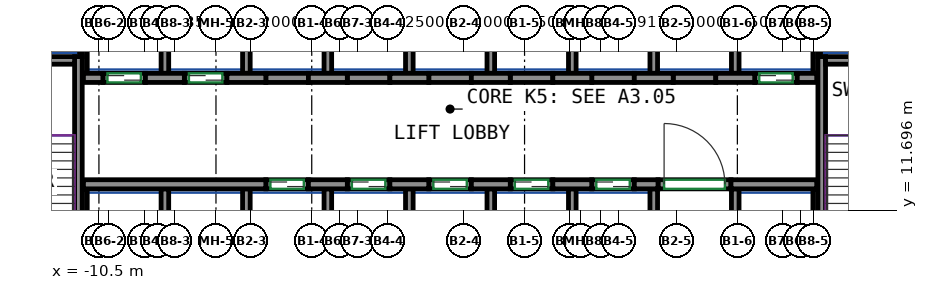
"""IFC4 building model, lengths in metres.
Left out: names, types, materials, properties, quantities, classifications, styles, units other than length and angle.
Written with IfcOpenShell. Run it as: python <this file> out.ifc"""

import sys

from ifc_helpers import new_model, si_unit, direction, frame, frame_2d, origin, place, context, subcontext, project, spatial, rectangle, extrude, source, transform, mapped, element, fill, save


model = new_model("IFC4")
c1 = context("Model", 3, precision=1e-05, world=origin(), true_north=direction((0.0, 1.0)))
c2 = subcontext(c1, "Body", "Model", "MODEL_VIEW")
j1 = project(units=[si_unit("LENGTHUNIT", "METRE"), si_unit("PLANEANGLEUNIT", "RADIAN")], contexts=[c1])
p1 = place(None, origin())
s1 = spatial("IfcSite", under=j1, at=p1, CompositionType="ELEMENT")
p2 = place(p1, origin())
s2 = spatial("IfcBuilding", under=s1, at=p2, CompositionType="ELEMENT")
p3 = place(p2, frame((0.0, 0.0, 22.5)))
s3 = spatial("IfcBuildingStorey", under=s2, at=p3, CompositionType="ELEMENT", Elevation=22.5)
m1 = source(origin(), c2, "Body", "SweptSolid", [
    extrude(rectangle(XDim=7.75, YDim=0.25, at=frame_2d((3.875, 0.0))), origin(), (0.0, 0.0, 1.0), 4.22),
])
p4 = place(p3, frame((-11.175, 9.0, 0.0), z_axis=(0.0, 0.0, 1.0), x_axis=(0.0, 1.0, 0.0)))
e1 = element("IfcWall", 1, at=p4, inside=s3, PredefinedType="SHEAR", context=c2, shape_type="MappedRepresentation", body=[
    mapped(m1, transform((0.0, 0.0, 0.0))),
])
m2 = source(origin(), c2, "Body", "SweptSolid", [
    extrude(rectangle(XDim=3.7, YDim=0.25, at=frame_2d((1.85, 0.0))), origin(), (0.0, 0.0, 1.0), 4.22),
])
p5 = place(p3, frame((-15.0, 16.625, 0.0), z_axis=(0.0, 0.0, 1.0), x_axis=(1.0, 0.0, 0.0)))
e2 = element("IfcWall", 2, at=p5, inside=s3, PredefinedType="SHEAR", context=c2, shape_type="MappedRepresentation", body=[
    mapped(m2, transform((0.0, 0.0, 0.0))),
])
p6 = place(p3, frame((13.275, 9.0, 0.0), z_axis=(0.0, 0.0, 1.0), x_axis=(0.0, 1.0, 0.0)))
e3 = element("IfcWall", 3, at=p6, inside=s3, PredefinedType="SHEAR", context=c2, shape_type="MappedRepresentation", body=[
    mapped(m1, transform((0.0, 0.0, 0.0))),
])
m3 = source(origin(), c2, "Body", "SweptSolid", [
    extrude(rectangle(XDim=3.7, YDim=0.25, at=frame_2d((1.85, 0.0))), origin(), (0.0, 0.0, 1.0), 4.22),
])
p7 = place(p3, frame((13.4, 16.625, 0.0), z_axis=(0.0, 0.0, 1.0), x_axis=(1.0, 0.0, 0.0)))
e4 = element("IfcWall", 4, at=p7, inside=s3, PredefinedType="SHEAR", context=c2, shape_type="MappedRepresentation", body=[
    mapped(m3, transform((0.0, 0.0, 0.0))),
])
m4 = source(origin(), c2, "Body", "SweptSolid", [
    extrude(rectangle(XDim=6.0, YDim=0.3, at=frame_2d((3.0, 0.0))), origin(), (0.0, 0.0, 1.0), 4.22),
])
p8 = place(p3, frame((-11.01, 12.55, 0.0), z_axis=(0.0, 0.0, 1.0), x_axis=(1.0, 0.0, 0.0)))
e5 = element("IfcWall", 5, at=p8, inside=s3, PredefinedType="SHEAR", context=c2, shape_type="MappedRepresentation", body=[
    mapped(m4, transform((0.0, 0.0, 0.0))),
])
m5 = source(origin(), c2, "Body", "SweptSolid", [
    extrude(rectangle(XDim=1.28, YDim=0.3, at=frame_2d((0.64, 0.0))), origin(), (0.0, 0.0, 1.0), 4.22),
])
for number, where, z_axis, x_axis in (
    (6, (-3.61, 12.55, 0.0), (0.0, 0.0, 1.0), (1.0, 0.0, 0.0)),
    (7, (-0.93, 12.55, 0.0), (0.0, 0.0, 1.0), (1.0, 0.0, 0.0)),
    (8, (1.75, 12.55, 0.0), (0.0, 0.0, 1.0), (1.0, 0.0, 0.0)),
    (9, (4.43, 12.55, 0.0), (0.0, 0.0, 1.0), (1.0, 0.0, 0.0)),
):
    element("IfcWall", number, at=place(p3, frame(where, z_axis=z_axis, x_axis=x_axis)), inside=s3, PredefinedType="SHEAR", context=c2, shape_type="MappedRepresentation", body=[
        mapped(m5, transform((0.0, 0.0, 0.0))),
    ])
m6 = source(origin(), c2, "Body", "SweptSolid", [
    extrude(rectangle(XDim=0.78, YDim=0.3, at=frame_2d((0.39, 0.0))), origin(), (0.0, 0.0, 1.0), 4.22),
])
p9 = place(p3, frame((7.11, 12.55, 0.0), z_axis=(0.0, 0.0, 1.0), x_axis=(1.0, 0.0, 0.0)))
e10 = element("IfcWall", 10, at=p9, inside=s3, PredefinedType="SHEAR", context=c2, shape_type="MappedRepresentation", body=[
    mapped(m6, transform((0.0, 0.0, 0.0))),
])
m7 = source(origin(), c2, "Body", "SweptSolid", [
    extrude(rectangle(XDim=2.82, YDim=0.3, at=frame_2d((1.41, 0.0))), origin(), (0.0, 0.0, 1.0), 4.22),
])
p10 = place(p3, frame((10.29, 12.55, 0.0), z_axis=(0.0, 0.0, 1.0), x_axis=(1.0, 0.0, 0.0)))
e11 = element("IfcWall", 11, at=p10, inside=s3, PredefinedType="SHEAR", context=c2, shape_type="MappedRepresentation", body=[
    mapped(m7, transform((0.0, 0.0, 0.0))),
])
m8 = source(origin(), c2, "Body", "SweptSolid", [
    extrude(rectangle(XDim=0.64, YDim=0.3, at=frame_2d((0.32, 0.0))), origin(), (0.0, 0.0, 1.0), 4.22),
])
p11 = place(p3, frame((-11.01, 16.05, 0.0), z_axis=(0.0, 0.0, 1.0), x_axis=(1.0, 0.0, 0.0)))
e12 = element("IfcWall", 12, at=p11, inside=s3, PredefinedType="SHEAR", context=c2, shape_type="MappedRepresentation", body=[
    mapped(m8, transform((0.0, 0.0, 0.0))),
])
for number, where, z_axis, x_axis in (
    (13, (-8.97, 16.05, 0.0), (0.0, 0.0, 1.0), (1.0, 0.0, 0.0)),
    (14, (-6.29, 16.05, 0.0), (0.0, 0.0, 1.0), (1.0, 0.0, 0.0)),
    (15, (-3.61, 16.05, 0.0), (0.0, 0.0, 1.0), (1.0, 0.0, 0.0)),
    (16, (-0.93, 16.05, 0.0), (0.0, 0.0, 1.0), (1.0, 0.0, 0.0)),
    (17, (1.75, 16.05, 0.0), (0.0, 0.0, 1.0), (1.0, 0.0, 0.0)),
    (18, (4.43, 16.05, 0.0), (0.0, 0.0, 1.0), (1.0, 0.0, 0.0)),
):
    element("IfcWall", number, at=place(p3, frame(where, z_axis=z_axis, x_axis=x_axis)), inside=s3, PredefinedType="SHEAR", context=c2, shape_type="MappedRepresentation", body=[
        mapped(m5, transform((0.0, 0.0, 0.0))),
    ])
m9 = source(origin(), c2, "Body", "SweptSolid", [
    extrude(rectangle(XDim=1.28, YDim=0.3, at=frame_2d((0.64, 0.0))), origin(), (0.0, 0.0, 1.0), 4.22),
])
p12 = place(p3, frame((7.11, 16.05, 0.0), z_axis=(0.0, 0.0, 1.0), x_axis=(1.0, 0.0, 0.0)))
e19 = element("IfcWall", 19, at=p12, inside=s3, PredefinedType="SHEAR", context=c2, shape_type="MappedRepresentation", body=[
    mapped(m9, transform((0.0, 0.0, 0.0))),
])
p13 = place(p3, frame((9.79, 16.05, 0.0), z_axis=(0.0, 0.0, 1.0), x_axis=(1.0, 0.0, 0.0)))
e20 = element("IfcWall", 20, at=p13, inside=s3, PredefinedType="SHEAR", context=c2, shape_type="MappedRepresentation", body=[
    mapped(m5, transform((0.0, 0.0, 0.0))),
])
m10 = source(origin(), c2, "Body", "SweptSolid", [
    extrude(rectangle(XDim=0.64, YDim=0.3, at=frame_2d((0.32, 0.0))), origin(), (0.0, 0.0, 1.0), 4.22),
])
p14 = place(p3, frame((12.47, 16.05, 0.0), z_axis=(0.0, 0.0, 1.0), x_axis=(1.0, 0.0, 0.0)))
e21 = element("IfcWall", 21, at=p14, inside=s3, PredefinedType="SHEAR", context=c2, shape_type="MappedRepresentation", body=[
    mapped(m10, transform((0.0, 0.0, 0.0))),
])
m11 = source(origin(), c2, "Body", "SweptSolid", [
    extrude(rectangle(XDim=1.4, YDim=0.3, at=frame_2d((0.7, 0.0))), origin(), (0.0, 0.0, 1.0), 4.22),
])
p15 = place(p3, frame((-5.01, 12.55, 0.0), z_axis=(0.0, 0.0, 1.0), x_axis=(1.0, 0.0, 0.0)))
e22 = element("IfcWall", 22, at=p15, inside=s3, PredefinedType="PARTITIONING", context=c2, shape_type="MappedRepresentation", body=[
    mapped(m11, transform((0.0, 0.0, 0.0))),
])
p16 = place(p15, frame((0.15, 0.0, 0.0)))
e23 = element("IfcOpeningElement", 23, at=p16, cuts=e22, PredefinedType="OPENING", context=c2, shape_type="SweptSolid", body=[
    extrude(rectangle(XDim=1.1, YDim=2.1, at=frame_2d((0.55, 1.05))), frame((0.0, 0.16, 0.0), z_axis=(0.0, -1.0, 0.0), x_axis=(1.0, 0.0, 0.0)), (0.0, 0.0, 1.0), 0.32),
])
m12 = source(origin(), c2, "Body", "SweptSolid", [
    extrude(rectangle(XDim=1.4, YDim=0.3, at=frame_2d((0.7, 0.0))), origin(), (0.0, 0.0, 1.0), 4.22),
])
p17 = place(p3, frame((-2.33, 12.55, 0.0), z_axis=(0.0, 0.0, 1.0), x_axis=(1.0, 0.0, 0.0)))
e24 = element("IfcWall", 24, at=p17, inside=s3, PredefinedType="PARTITIONING", context=c2, shape_type="MappedRepresentation", body=[
    mapped(m12, transform((0.0, 0.0, 0.0))),
])
p18 = place(p17, frame((0.15, 0.0, 0.0)))
e25 = element("IfcOpeningElement", 25, at=p18, cuts=e24, PredefinedType="OPENING", context=c2, shape_type="SweptSolid", body=[
    extrude(rectangle(XDim=1.1, YDim=2.1, at=frame_2d((0.55, 1.05))), frame((0.0, 0.16, 0.0), z_axis=(0.0, -1.0, 0.0), x_axis=(1.0, 0.0, 0.0)), (0.0, 0.0, 1.0), 0.32),
])
p19 = place(p3, frame((0.35, 12.55, 0.0), z_axis=(0.0, 0.0, 1.0), x_axis=(1.0, 0.0, 0.0)))
e26 = element("IfcWall", 26, at=p19, inside=s3, PredefinedType="PARTITIONING", context=c2, shape_type="MappedRepresentation", body=[
    mapped(m11, transform((0.0, 0.0, 0.0))),
])
p20 = place(p19, frame((0.15, 0.0, 0.0)))
e27 = element("IfcOpeningElement", 27, at=p20, cuts=e26, PredefinedType="OPENING", context=c2, shape_type="SweptSolid", body=[
    extrude(rectangle(XDim=1.1, YDim=2.1, at=frame_2d((0.55, 1.05))), frame((0.0, 0.16, 0.0), z_axis=(0.0, -1.0, 0.0), x_axis=(1.0, 0.0, 0.0)), (0.0, 0.0, 1.0), 0.32),
])
p21 = place(p3, frame((3.03, 12.55, 0.0), z_axis=(0.0, 0.0, 1.0), x_axis=(1.0, 0.0, 0.0)))
e28 = element("IfcWall", 28, at=p21, inside=s3, PredefinedType="PARTITIONING", context=c2, shape_type="MappedRepresentation", body=[
    mapped(m11, transform((0.0, 0.0, 0.0))),
])
p22 = place(p21, frame((0.15, 0.0, 0.0)))
e29 = element("IfcOpeningElement", 29, at=p22, cuts=e28, PredefinedType="OPENING", context=c2, shape_type="SweptSolid", body=[
    extrude(rectangle(XDim=1.1, YDim=2.1, at=frame_2d((0.55, 1.05))), frame((0.0, 0.16, 0.0), z_axis=(0.0, -1.0, 0.0), x_axis=(1.0, 0.0, 0.0)), (0.0, 0.0, 1.0), 0.32),
])
p23 = place(p3, frame((5.71, 12.55, 0.0), z_axis=(0.0, 0.0, 1.0), x_axis=(1.0, 0.0, 0.0)))
e30 = element("IfcWall", 30, at=p23, inside=s3, PredefinedType="PARTITIONING", context=c2, shape_type="MappedRepresentation", body=[
    mapped(m12, transform((0.0, 0.0, 0.0))),
])
p24 = place(p23, frame((0.15, 0.0, 0.0)))
e31 = element("IfcOpeningElement", 31, at=p24, cuts=e30, PredefinedType="OPENING", context=c2, shape_type="SweptSolid", body=[
    extrude(rectangle(XDim=1.1, YDim=2.1, at=frame_2d((0.55, 1.05))), frame((0.0, 0.16, 0.0), z_axis=(0.0, -1.0, 0.0), x_axis=(1.0, 0.0, 0.0)), (0.0, 0.0, 1.0), 0.32),
])
p25 = place(p3, frame((11.07, 16.05, 0.0), z_axis=(0.0, 0.0, 1.0), x_axis=(1.0, 0.0, 0.0)))
e32 = element("IfcWall", 32, at=p25, inside=s3, PredefinedType="PARTITIONING", context=c2, shape_type="MappedRepresentation", body=[
    mapped(m11, transform((0.0, 0.0, 0.0))),
])
p26 = place(p25, frame((0.15, 0.0, 0.0)))
e33 = element("IfcOpeningElement", 33, at=p26, cuts=e32, PredefinedType="OPENING", context=c2, shape_type="SweptSolid", body=[
    extrude(rectangle(XDim=1.1, YDim=2.1, at=frame_2d((0.55, 1.05))), frame((0.0, 0.16, 0.0), z_axis=(0.0, -1.0, 0.0), x_axis=(1.0, 0.0, 0.0)), (0.0, 0.0, 1.0), 0.32),
])
p27 = place(p3, frame((-10.37, 16.05, 0.0), z_axis=(0.0, 0.0, 1.0), x_axis=(1.0, 0.0, 0.0)))
e34 = element("IfcWall", 34, at=p27, inside=s3, PredefinedType="PARTITIONING", context=c2, shape_type="MappedRepresentation", body=[
    mapped(m12, transform((0.0, 0.0, 0.0))),
])
p28 = place(p27, frame((0.15, 0.0, 0.0)))
e35 = element("IfcOpeningElement", 35, at=p28, cuts=e34, PredefinedType="OPENING", context=c2, shape_type="SweptSolid", body=[
    extrude(rectangle(XDim=1.1, YDim=2.1, at=frame_2d((0.55, 1.05))), frame((0.0, 0.16, 0.0), z_axis=(0.0, -1.0, 0.0), x_axis=(1.0, 0.0, 0.0)), (0.0, 0.0, 1.0), 0.32),
])
p29 = place(p3, frame((-7.69, 16.05, 0.0), z_axis=(0.0, 0.0, 1.0), x_axis=(1.0, 0.0, 0.0)))
e36 = element("IfcWall", 36, at=p29, inside=s3, PredefinedType="PARTITIONING", context=c2, shape_type="MappedRepresentation", body=[
    mapped(m11, transform((0.0, 0.0, 0.0))),
])
p30 = place(p29, frame((0.15, 0.0, 0.0)))
e37 = element("IfcOpeningElement", 37, at=p30, cuts=e36, PredefinedType="OPENING", context=c2, shape_type="SweptSolid", body=[
    extrude(rectangle(XDim=1.1, YDim=2.1, at=frame_2d((0.55, 1.05))), frame((0.0, 0.16, 0.0), z_axis=(0.0, -1.0, 0.0), x_axis=(1.0, 0.0, 0.0)), (0.0, 0.0, 1.0), 0.32),
])
m13 = source(origin(), c2, "Body", "SweptSolid", [
    extrude(rectangle(XDim=2.4, YDim=0.3, at=frame_2d((1.2, 0.0))), origin(), (0.0, 0.0, 1.0), 4.22),
])
p31 = place(p3, frame((7.89, 12.55, 0.0), z_axis=(0.0, 0.0, 1.0), x_axis=(1.0, 0.0, 0.0)))
e38 = element("IfcWall", 38, at=p31, inside=s3, PredefinedType="PARTITIONING", context=c2, shape_type="MappedRepresentation", body=[
    mapped(m13, transform((0.0, 0.0, 0.0))),
])
p32 = place(p31, frame((0.2, 0.0, 0.0)))
e39 = element("IfcOpeningElement", 39, at=p32, cuts=e38, PredefinedType="OPENING", context=c2, shape_type="SweptSolid", body=[
    extrude(rectangle(XDim=2.0, YDim=2.1, at=frame_2d((1.0, 1.05))), frame((0.0, 0.16, 0.0), z_axis=(0.0, -1.0, 0.0), x_axis=(1.0, 0.0, 0.0)), (0.0, 0.0, 1.0), 0.32),
])
p33 = place(p3, frame((-5.01, 16.05, 0.0), z_axis=(0.0, 0.0, 1.0), x_axis=(1.0, 0.0, 0.0)))
e40 = element("IfcWall", 40, at=p33, inside=s3, PredefinedType="PARTITIONING", context=c2, shape_type="MappedRepresentation", body=[
    mapped(m11, transform((0.0, 0.0, 0.0))),
])
p34 = place(p3, frame((-2.33, 16.05, 0.0), z_axis=(0.0, 0.0, 1.0), x_axis=(1.0, 0.0, 0.0)))
e41 = element("IfcWall", 41, at=p34, inside=s3, PredefinedType="PARTITIONING", context=c2, shape_type="MappedRepresentation", body=[
    mapped(m12, transform((0.0, 0.0, 0.0))),
])
for number, where, z_axis, x_axis in (
    (42, (0.35, 16.05, 0.0), (0.0, 0.0, 1.0), (1.0, 0.0, 0.0)),
    (43, (3.03, 16.05, 0.0), (0.0, 0.0, 1.0), (1.0, 0.0, 0.0)),
):
    element("IfcWall", number, at=place(p3, frame(where, z_axis=z_axis, x_axis=x_axis)), inside=s3, PredefinedType="PARTITIONING", context=c2, shape_type="MappedRepresentation", body=[
        mapped(m11, transform((0.0, 0.0, 0.0))),
    ])
for number, where, z_axis, x_axis in (
    (44, (5.71, 16.05, 0.0), (0.0, 0.0, 1.0), (1.0, 0.0, 0.0)),
    (45, (8.39, 16.05, 0.0), (0.0, 0.0, 1.0), (1.0, 0.0, 0.0)),
):
    element("IfcWall", number, at=place(p3, frame(where, z_axis=z_axis, x_axis=x_axis)), inside=s3, PredefinedType="PARTITIONING", context=c2, shape_type="MappedRepresentation", body=[
        mapped(m12, transform((0.0, 0.0, 0.0))),
    ])
m14 = source(origin(), c2, "Body", "SweptSolid", [
    extrude(rectangle(XDim=3.275, YDim=0.165, at=frame_2d((1.638, 0.0))), origin(), (0.0, 0.0, 1.0), 4.22),
])
for number, where, z_axis, x_axis in (
    (46, (13.067, 16.2, 0.0), (0.0, 0.0, 1.0), (0.0, 1.0, 0.0)),
    (47, (-10.968, 16.2, 0.0), (0.0, 0.0, 1.0), (0.0, 1.0, 0.0)),
):
    element("IfcWall", number, at=place(p3, frame(where, z_axis=z_axis, x_axis=x_axis)), inside=s3, PredefinedType="PARTITIONING", context=c2, shape_type="MappedRepresentation", body=[
        mapped(m14, transform((0.0, 0.0, 0.0))),
    ])
m15 = source(origin(), c2, "Body", "SweptSolid", [
    extrude(rectangle(XDim=3.275, YDim=0.25, at=frame_2d((1.638, 0.0))), origin(), (0.0, 0.0, 1.0), 4.22),
])
p35 = place(p3, frame((10.43, 16.2, 0.0), z_axis=(0.0, 0.0, 1.0), x_axis=(0.0, 1.0, 0.0)))
e48 = element("IfcWall", 48, at=p35, inside=s3, PredefinedType="PARTITIONING", context=c2, shape_type="MappedRepresentation", body=[
    mapped(m15, transform((0.0, 0.0, 0.0))),
])
m16 = source(origin(), c2, "Body", "SweptSolid", [
    extrude(rectangle(XDim=2.725, YDim=0.085, at=frame_2d((1.363, 0.0))), origin(), (0.0, 0.0, 1.0), 4.22),
])
p36 = place(p3, frame((13.192, 16.75, 0.0), z_axis=(0.0, 0.0, 1.0), x_axis=(0.0, 1.0, 0.0)))
e49 = element("IfcWall", 49, at=p36, inside=s3, PredefinedType="PARTITIONING", context=c2, shape_type="MappedRepresentation", body=[
    mapped(m16, transform((0.0, 0.0, 0.0))),
])
for number, where, z_axis, x_axis in (
    (50, (2.39, 16.2, 0.0), (0.0, 0.0, 1.0), (0.0, 1.0, 0.0)),
    (51, (5.07, 16.2, 0.0), (0.0, 0.0, 1.0), (0.0, 1.0, 0.0)),
    (52, (7.75, 16.2, 0.0), (0.0, 0.0, 1.0), (0.0, 1.0, 0.0)),
    (53, (-0.29, 16.2, 0.0), (0.0, 0.0, 1.0), (0.0, 1.0, 0.0)),
):
    element("IfcWall", number, at=place(p3, frame(where, z_axis=z_axis, x_axis=x_axis)), inside=s3, PredefinedType="PARTITIONING", context=c2, shape_type="MappedRepresentation", body=[
        mapped(m15, transform((0.0, 0.0, 0.0))),
    ])
p37 = place(p3, frame((-11.093, 16.75, 0.0), z_axis=(0.0, 0.0, 1.0), x_axis=(0.0, 1.0, 0.0)))
e54 = element("IfcWall", 54, at=p37, inside=s3, PredefinedType="PARTITIONING", context=c2, shape_type="MappedRepresentation", body=[
    mapped(m16, transform((0.0, 0.0, 0.0))),
])
for number, where, z_axis, x_axis in (
    (55, (-2.97, 16.2, 0.0), (0.0, 0.0, 1.0), (0.0, 1.0, 0.0)),
    (56, (-5.65, 16.2, 0.0), (0.0, 0.0, 1.0), (0.0, 1.0, 0.0)),
    (57, (-8.33, 16.2, 0.0), (0.0, 0.0, 1.0), (0.0, 1.0, 0.0)),
):
    element("IfcWall", number, at=place(p3, frame(where, z_axis=z_axis, x_axis=x_axis)), inside=s3, PredefinedType="PARTITIONING", context=c2, shape_type="MappedRepresentation", body=[
        mapped(m15, transform((0.0, 0.0, 0.0))),
    ])
m17 = source(origin(), c2, "Body", "SweptSolid", [
    extrude(rectangle(XDim=3.4, YDim=0.25, at=frame_2d((1.7, 0.0))), origin(), (0.0, 0.0, 1.0), 4.22),
])
p38 = place(p3, frame((10.43, 9.0, 0.0), z_axis=(0.0, 0.0, 1.0), x_axis=(0.0, 1.0, 0.0)))
e58 = element("IfcWall", 58, at=p38, inside=s3, PredefinedType="PARTITIONING", context=c2, shape_type="MappedRepresentation", body=[
    mapped(m17, transform((0.0, 0.0, 0.0))),
])
m18 = source(origin(), c2, "Body", "SweptSolid", [
    extrude(rectangle(XDim=3.4, YDim=0.165, at=frame_2d((1.7, 0.0))), origin(), (0.0, 0.0, 1.0), 4.22),
])
p39 = place(p3, frame((13.067, 9.0, 0.0), z_axis=(0.0, 0.0, 1.0), x_axis=(0.0, 1.0, 0.0)))
e59 = element("IfcWall", 59, at=p39, inside=s3, PredefinedType="PARTITIONING", context=c2, shape_type="MappedRepresentation", body=[
    mapped(m18, transform((0.0, 0.0, 0.0))),
])
for number, where, z_axis, x_axis in (
    (60, (2.39, 9.0, 0.0), (0.0, 0.0, 1.0), (0.0, 1.0, 0.0)),
    (61, (5.07, 9.0, 0.0), (0.0, 0.0, 1.0), (0.0, 1.0, 0.0)),
    (62, (7.75, 9.0, 0.0), (0.0, 0.0, 1.0), (0.0, 1.0, 0.0)),
    (63, (-0.29, 9.0, 0.0), (0.0, 0.0, 1.0), (0.0, 1.0, 0.0)),
):
    element("IfcWall", number, at=place(p3, frame(where, z_axis=z_axis, x_axis=x_axis)), inside=s3, PredefinedType="PARTITIONING", context=c2, shape_type="MappedRepresentation", body=[
        mapped(m17, transform((0.0, 0.0, 0.0))),
    ])
p40 = place(p3, frame((-10.968, 9.0, 0.0), z_axis=(0.0, 0.0, 1.0), x_axis=(0.0, 1.0, 0.0)))
e64 = element("IfcWall", 64, at=p40, inside=s3, PredefinedType="PARTITIONING", context=c2, shape_type="MappedRepresentation", body=[
    mapped(m18, transform((0.0, 0.0, 0.0))),
])
for number, where, z_axis, x_axis in (
    (65, (-2.97, 9.0, 0.0), (0.0, 0.0, 1.0), (0.0, 1.0, 0.0)),
    (66, (-5.65, 9.0, 0.0), (0.0, 0.0, 1.0), (0.0, 1.0, 0.0)),
    (67, (-8.33, 9.0, 0.0), (0.0, 0.0, 1.0), (0.0, 1.0, 0.0)),
):
    element("IfcWall", number, at=place(p3, frame(where, z_axis=z_axis, x_axis=x_axis)), inside=s3, PredefinedType="PARTITIONING", context=c2, shape_type="MappedRepresentation", body=[
        mapped(m17, transform((0.0, 0.0, 0.0))),
    ])
p41 = place(p32, origin())
e68 = element("IfcDoor", 68, at=p41, inside=s3, OperationType="DOUBLE_DOOR_SINGLE_SWING", PredefinedType="DOOR", context=c2, shape_type="SweptSolid", body=[
    extrude(rectangle(XDim=2.0, YDim=2.1, at=frame_2d((1.0, 1.05))), frame((0.0, 0.025, 0.0), z_axis=(0.0, -1.0, 0.0), x_axis=(1.0, 0.0, 0.0)), (0.0, 0.0, 1.0), 0.05),
])
fill(e39, e68)
p42 = place(p16, origin())
e69 = element("IfcDoor", 69, at=p42, inside=s3, OperationType="DOUBLE_DOOR_SLIDING", PredefinedType="DOOR", context=c2, shape_type="SweptSolid", body=[
    extrude(rectangle(XDim=1.1, YDim=2.1, at=frame_2d((0.55, 1.05))), frame((0.0, 0.025, 0.0), z_axis=(0.0, -1.0, 0.0), x_axis=(1.0, 0.0, 0.0)), (0.0, 0.0, 1.0), 0.05),
])
fill(e23, e69)
p43 = place(p18, origin())
e70 = element("IfcDoor", 70, at=p43, inside=s3, OperationType="DOUBLE_DOOR_SLIDING", PredefinedType="DOOR", context=c2, shape_type="SweptSolid", body=[
    extrude(rectangle(XDim=1.1, YDim=2.1, at=frame_2d((0.55, 1.05))), frame((0.0, 0.025, 0.0), z_axis=(0.0, -1.0, 0.0), x_axis=(1.0, 0.0, 0.0)), (0.0, 0.0, 1.0), 0.05),
])
fill(e25, e70)
p44 = place(p20, origin())
e71 = element("IfcDoor", 71, at=p44, inside=s3, OperationType="DOUBLE_DOOR_SLIDING", PredefinedType="DOOR", context=c2, shape_type="SweptSolid", body=[
    extrude(rectangle(XDim=1.1, YDim=2.1, at=frame_2d((0.55, 1.05))), frame((0.0, 0.025, 0.0), z_axis=(0.0, -1.0, 0.0), x_axis=(1.0, 0.0, 0.0)), (0.0, 0.0, 1.0), 0.05),
])
fill(e27, e71)
p45 = place(p22, origin())
e72 = element("IfcDoor", 72, at=p45, inside=s3, OperationType="DOUBLE_DOOR_SLIDING", PredefinedType="DOOR", context=c2, shape_type="SweptSolid", body=[
    extrude(rectangle(XDim=1.1, YDim=2.1, at=frame_2d((0.55, 1.05))), frame((0.0, 0.025, 0.0), z_axis=(0.0, -1.0, 0.0), x_axis=(1.0, 0.0, 0.0)), (0.0, 0.0, 1.0), 0.05),
])
fill(e29, e72)
p46 = place(p24, origin())
e73 = element("IfcDoor", 73, at=p46, inside=s3, OperationType="DOUBLE_DOOR_SLIDING", PredefinedType="DOOR", context=c2, shape_type="SweptSolid", body=[
    extrude(rectangle(XDim=1.1, YDim=2.1, at=frame_2d((0.55, 1.05))), frame((0.0, 0.025, 0.0), z_axis=(0.0, -1.0, 0.0), x_axis=(1.0, 0.0, 0.0)), (0.0, 0.0, 1.0), 0.05),
])
fill(e31, e73)
p47 = place(p26, origin())
e74 = element("IfcDoor", 74, at=p47, inside=s3, OperationType="DOUBLE_DOOR_SLIDING", PredefinedType="DOOR", context=c2, shape_type="SweptSolid", body=[
    extrude(rectangle(XDim=1.1, YDim=2.1, at=frame_2d((0.55, 1.05))), frame((0.0, 0.025, 0.0), z_axis=(0.0, -1.0, 0.0), x_axis=(1.0, 0.0, 0.0)), (0.0, 0.0, 1.0), 0.05),
])
fill(e33, e74)
p48 = place(p28, origin())
e75 = element("IfcDoor", 75, at=p48, inside=s3, OperationType="DOUBLE_DOOR_SLIDING", PredefinedType="DOOR", context=c2, shape_type="SweptSolid", body=[
    extrude(rectangle(XDim=1.1, YDim=2.1, at=frame_2d((0.55, 1.05))), frame((0.0, 0.025, 0.0), z_axis=(0.0, -1.0, 0.0), x_axis=(1.0, 0.0, 0.0)), (0.0, 0.0, 1.0), 0.05),
])
fill(e35, e75)
p49 = place(p30, origin())
e76 = element("IfcDoor", 76, at=p49, inside=s3, OperationType="DOUBLE_DOOR_SLIDING", PredefinedType="DOOR", context=c2, shape_type="SweptSolid", body=[
    extrude(rectangle(XDim=1.1, YDim=2.1, at=frame_2d((0.55, 1.05))), frame((0.0, 0.025, 0.0), z_axis=(0.0, -1.0, 0.0), x_axis=(1.0, 0.0, 0.0)), (0.0, 0.0, 1.0), 0.05),
])
fill(e37, e76)
save(model, sys.argv[1])
